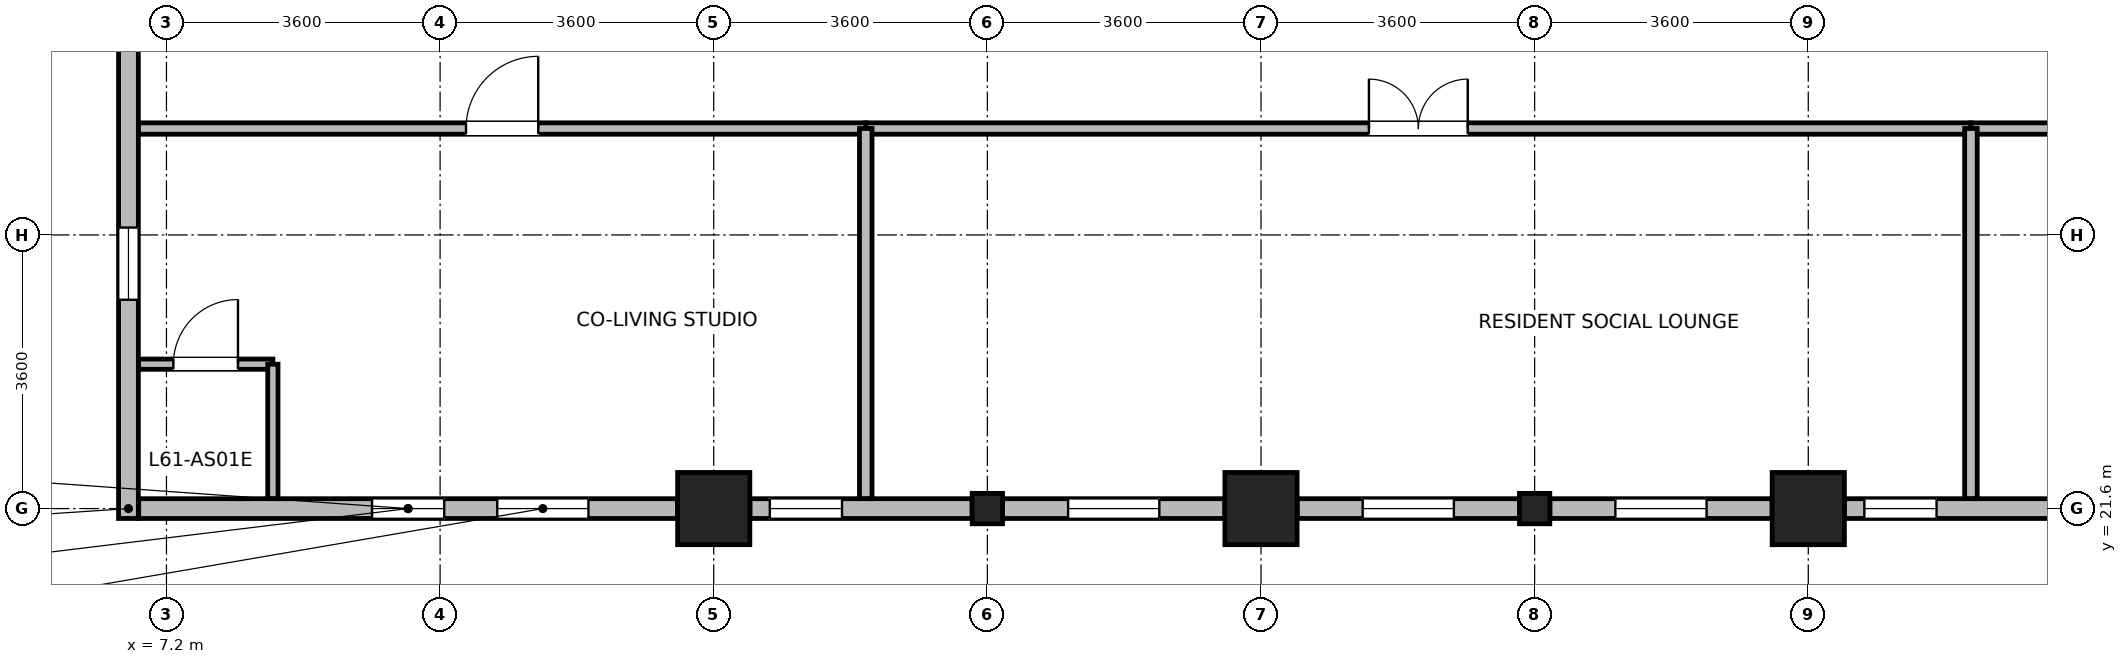
"""IFC4 building model, lengths in metres.
Left out: names, types, materials, properties, quantities, classifications, styles, units other than length and angle.
Written with IfcOpenShell. Run it as: python <this file> out.ifc"""

import sys

from ifc_helpers import new_model, si_unit, direction, frame, frame_2d, origin, origin_2d, place, context, subcontext, project, spatial, rectangle, i_section, extrude, source, transform, mapped, element, fill, save


model = new_model("IFC4")
c1 = context("Model", 3, precision=1e-05, world=origin(), true_north=direction((0.0, 1.0)))
c2 = subcontext(c1, "Body", "Model", "MODEL_VIEW")
j1 = project(units=[si_unit("LENGTHUNIT", "METRE"), si_unit("PLANEANGLEUNIT", "RADIAN")], contexts=[c1])
p1 = place(None, origin())
s1 = spatial("IfcSite", under=j1, at=p1, CompositionType="ELEMENT")
p2 = place(p1, origin())
s2 = spatial("IfcBuilding", under=s1, at=p2, CompositionType="ELEMENT")
p3 = place(p2, frame((0.0, 0.0, 238.8)))
s3 = spatial("IfcBuildingStorey", under=s2, at=p3, CompositionType="ELEMENT", Elevation=238.8)
m1 = source(origin(), c2, "Body", "SweptSolid", [
    extrude(rectangle(XDim=0.95, YDim=0.95, at=origin_2d()), origin(), (0.0, 0.0, 1.0), 3.7),
])
for number, where, z_axis, x_axis in (
    (1, (14.4, 21.6, 0.0), (0.0, 0.0, 1.0), (1.0, 0.0, 0.0)),
    (2, (21.6, 21.6, 0.0), (0.0, 0.0, 1.0), (1.0, 0.0, 0.0)),
    (3, (28.8, 21.6, 0.0), (0.0, 0.0, 1.0), (1.0, 0.0, 0.0)),
):
    element("IfcColumn", number, at=place(p3, frame(where, z_axis=z_axis, x_axis=x_axis)), inside=s3, PredefinedType="COLUMN", context=c2, shape_type="MappedRepresentation", body=[
        mapped(m1, transform((0.0, 0.0, 0.0), x_axis=(1.0, 0.0, 0.0), y_axis=(0.0, 1.0, 0.0), z_axis=(0.0, 0.0, 1.0), scale=1.0)),
    ])
m2 = source(origin(), c2, "Body", "SweptSolid", [
    extrude(i_section(OverallWidth=0.399, OverallDepth=0.4, WebThickness=0.017, FlangeThickness=0.023, FilletRadius=0.015, at=origin_2d()), origin(), (0.0, 0.0, 1.0), 3.7),
])
for number, where, z_axis, x_axis in (
    (4, (18.0, 21.6, 0.0), (0.0, 0.0, 1.0), (1.0, 0.0, 0.0)),
    (5, (25.2, 21.6, 0.0), (0.0, 0.0, 1.0), (1.0, 0.0, 0.0)),
):
    element("IfcColumn", number, at=place(p3, frame(where, z_axis=z_axis, x_axis=x_axis)), inside=s3, PredefinedType="COLUMN", context=c2, shape_type="MappedRepresentation", body=[
        mapped(m2, transform((0.0, 0.0, 0.0), x_axis=(1.0, 0.0, 0.0), y_axis=(0.0, 1.0, 0.0), z_axis=(0.0, 0.0, 1.0), scale=1.0)),
    ])
p4 = place(p3, frame((13.924, 21.6, 0.0), z_axis=(0.0, 0.0, 1.0), x_axis=(-1.0, 0.0, 0.0)))
e6 = element("IfcWall", 6, at=p4, inside=s3, PredefinedType="STANDARD", context=c2, shape_type="SweptSolid", body=[
    extrude(rectangle(XDim=7.089, YDim=0.26, at=frame_2d((3.544, 0.0))), origin(), (0.0, 0.0, 1.0), 3.42),
])
p5 = place(p4, frame((1.172, 0.0, 0.85)))
e7 = element("IfcOpeningElement", 7, at=p5, cuts=e6, PredefinedType="OPENING", context=c2, shape_type="SweptSolid", body=[
    extrude(rectangle(XDim=1.2, YDim=1.75, at=frame_2d((0.6, 0.875))), frame((0.0, 0.14, 0.0), z_axis=(0.0, -1.0, 0.0), x_axis=(1.0, 0.0, 0.0)), (0.0, 0.0, 1.0), 0.28),
])
p6 = place(p4, frame((3.07, 0.0, 0.85)))
e8 = element("IfcOpeningElement", 8, at=p6, cuts=e6, PredefinedType="OPENING", context=c2, shape_type="SweptSolid", body=[
    extrude(rectangle(XDim=0.95, YDim=1.75, at=frame_2d((0.475, 0.875))), frame((0.0, 0.14, 0.0), z_axis=(0.0, -1.0, 0.0), x_axis=(1.0, 0.0, 0.0)), (0.0, 0.0, 1.0), 0.28),
])
p7 = place(p3, frame((17.8, 21.6, 0.0), z_axis=(0.0, 0.0, 1.0), x_axis=(-1.0, 0.0, 0.0)))
e9 = element("IfcWall", 9, at=p7, inside=s3, PredefinedType="STANDARD", context=c2, shape_type="SweptSolid", body=[
    extrude(rectangle(XDim=2.924, YDim=0.26, at=frame_2d((1.462, 0.0))), origin(), (0.0, 0.0, 1.0), 3.02),
])
p8 = place(p7, frame((1.712, 0.0, 0.85)))
e10 = element("IfcOpeningElement", 10, at=p8, cuts=e9, PredefinedType="OPENING", context=c2, shape_type="SweptSolid", body=[
    extrude(rectangle(XDim=0.95, YDim=1.75, at=frame_2d((0.475, 0.875))), frame((0.0, 0.14, 0.0), z_axis=(0.0, -1.0, 0.0), x_axis=(1.0, 0.0, 0.0)), (0.0, 0.0, 1.0), 0.28),
])
p9 = place(p3, frame((21.124, 21.6, 0.0), z_axis=(0.0, 0.0, 1.0), x_axis=(-1.0, 0.0, 0.0)))
e11 = element("IfcWall", 11, at=p9, inside=s3, PredefinedType="STANDARD", context=c2, shape_type="SweptSolid", body=[
    extrude(rectangle(XDim=2.924, YDim=0.26, at=frame_2d((1.462, 0.0))), origin(), (0.0, 0.0, 1.0), 3.02),
])
p10 = place(p9, frame((0.862, 0.0, 0.85)))
e12 = element("IfcOpeningElement", 12, at=p10, cuts=e11, PredefinedType="OPENING", context=c2, shape_type="SweptSolid", body=[
    extrude(rectangle(XDim=1.2, YDim=1.75, at=frame_2d((0.6, 0.875))), frame((0.0, 0.14, 0.0), z_axis=(0.0, -1.0, 0.0), x_axis=(1.0, 0.0, 0.0)), (0.0, 0.0, 1.0), 0.28),
])
p11 = place(p3, frame((25.0, 21.6, 0.0), z_axis=(0.0, 0.0, 1.0), x_axis=(-1.0, 0.0, 0.0)))
e13 = element("IfcWall", 13, at=p11, inside=s3, PredefinedType="STANDARD", context=c2, shape_type="SweptSolid", body=[
    extrude(rectangle(XDim=2.924, YDim=0.26, at=frame_2d((1.462, 0.0))), origin(), (0.0, 0.0, 1.0), 3.02),
])
p12 = place(p11, frame((0.862, 0.0, 0.85)))
e14 = element("IfcOpeningElement", 14, at=p12, cuts=e13, PredefinedType="OPENING", context=c2, shape_type="SweptSolid", body=[
    extrude(rectangle(XDim=1.2, YDim=1.75, at=frame_2d((0.6, 0.875))), frame((0.0, 0.14, 0.0), z_axis=(0.0, -1.0, 0.0), x_axis=(1.0, 0.0, 0.0)), (0.0, 0.0, 1.0), 0.28),
])
p13 = place(p3, frame((28.324, 21.6, 0.0), z_axis=(0.0, 0.0, 1.0), x_axis=(-1.0, 0.0, 0.0)))
e15 = element("IfcWall", 15, at=p13, inside=s3, PredefinedType="STANDARD", context=c2, shape_type="SweptSolid", body=[
    extrude(rectangle(XDim=2.924, YDim=0.26, at=frame_2d((1.462, 0.0))), origin(), (0.0, 0.0, 1.0), 3.02),
])
p14 = place(p13, frame((0.862, 0.0, 0.85)))
e16 = element("IfcOpeningElement", 16, at=p14, cuts=e15, PredefinedType="OPENING", context=c2, shape_type="SweptSolid", body=[
    extrude(rectangle(XDim=1.2, YDim=1.75, at=frame_2d((0.6, 0.875))), frame((0.0, 0.14, 0.0), z_axis=(0.0, -1.0, 0.0), x_axis=(1.0, 0.0, 0.0)), (0.0, 0.0, 1.0), 0.28),
])
p15 = place(p3, frame((32.199, 21.6, 0.0), z_axis=(0.0, 0.0, 1.0), x_axis=(-1.0, 0.0, 0.0)))
e17 = element("IfcWall", 17, at=p15, inside=s3, PredefinedType="STANDARD", context=c2, shape_type="SweptSolid", body=[
    extrude(rectangle(XDim=2.924, YDim=0.26, at=frame_2d((1.462, 0.0))), origin(), (0.0, 0.0, 1.0), 3.02),
])
p16 = place(p15, frame((1.712, 0.0, 0.85)))
e18 = element("IfcOpeningElement", 18, at=p16, cuts=e17, PredefinedType="OPENING", context=c2, shape_type="SweptSolid", body=[
    extrude(rectangle(XDim=0.95, YDim=1.75, at=frame_2d((0.475, 0.875))), frame((0.0, 0.14, 0.0), z_axis=(0.0, -1.0, 0.0), x_axis=(1.0, 0.0, 0.0)), (0.0, 0.0, 1.0), 0.28),
])
p17 = place(p3, frame((6.7, 21.47, 0.0), z_axis=(0.0, 0.0, 1.0), x_axis=(0.0, 1.0, 0.0)))
e19 = element("IfcWall", 19, at=p17, inside=s3, PredefinedType="STANDARD", context=c2, shape_type="SweptSolid", body=[
    extrude(rectangle(XDim=6.704, YDim=0.26, at=frame_2d((3.352, 0.0))), origin(), (0.0, 0.0, 1.0), 3.42),
])
p18 = place(p17, frame((2.877, 0.0, 0.85)))
e20 = element("IfcOpeningElement", 20, at=p18, cuts=e19, PredefinedType="OPENING", context=c2, shape_type="SweptSolid", body=[
    extrude(rectangle(XDim=0.95, YDim=1.75, at=frame_2d((0.475, 0.875))), frame((0.0, 0.14, 0.0), z_axis=(0.0, -1.0, 0.0), x_axis=(1.0, 0.0, 0.0)), (0.0, 0.0, 1.0), 0.28),
])
p19 = place(p3, frame((6.832, 23.5, 0.0), z_axis=(0.0, 0.0, 1.0), x_axis=(1.0, 0.0, 0.0)))
e21 = element("IfcWall", 21, at=p19, inside=s3, PredefinedType="PARTITIONING", context=c2, shape_type="SweptSolid", body=[
    extrude(rectangle(XDim=1.768, YDim=0.135, at=frame_2d((0.884, 0.0))), origin(), (0.0, 0.0, 1.0), 3.42),
])
p20 = place(p19, frame((0.459, 0.0, 0.0)))
e22 = element("IfcOpeningElement", 22, at=p20, cuts=e21, PredefinedType="OPENING", context=c2, shape_type="SweptSolid", body=[
    extrude(rectangle(XDim=0.85, YDim=2.04, at=frame_2d((0.425, 1.02))), frame((0.0, 0.078, 0.0), z_axis=(0.0, -1.0, 0.0), x_axis=(1.0, 0.0, 0.0)), (0.0, 0.0, 1.0), 0.155),
])
p21 = place(p3, frame((8.6, 21.732, 0.0), z_axis=(0.0, 0.0, 1.0), x_axis=(0.0, 1.0, 0.0)))
e23 = element("IfcWall", 23, at=p21, inside=s3, PredefinedType="PARTITIONING", context=c2, shape_type="SweptSolid", body=[
    extrude(rectangle(XDim=1.768, YDim=0.135, at=frame_2d((0.884, 0.0))), origin(), (0.0, 0.0, 1.0), 3.42),
])
p22 = place(p3, frame((16.4, 26.6, 0.0), z_axis=(0.0, 0.0, 1.0), x_axis=(1.0, 0.0, 0.0)))
e24 = element("IfcWall", 24, at=p22, inside=s3, PredefinedType="PARTITIONING", context=c2, shape_type="SweptSolid", body=[
    extrude(rectangle(XDim=14.54, YDim=0.15, at=frame_2d((7.27, 0.0))), origin(), (0.0, 0.0, 1.0), 3.42),
])
p23 = place(p22, frame((6.62, 0.0, 0.0)))
e25 = element("IfcOpeningElement", 25, at=p23, cuts=e24, PredefinedType="OPENING", context=c2, shape_type="SweptSolid", body=[
    extrude(rectangle(XDim=1.3, YDim=2.12, at=frame_2d((0.65, 1.06))), frame((0.0, 0.085, 0.0), z_axis=(0.0, -1.0, 0.0), x_axis=(1.0, 0.0, 0.0)), (0.0, 0.0, 1.0), 0.17),
])
p24 = place(p3, frame((6.832, 26.6, 0.0), z_axis=(0.0, 0.0, 1.0), x_axis=(1.0, 0.0, 0.0)))
e26 = element("IfcWall", 26, at=p24, inside=s3, PredefinedType="PARTITIONING", context=c2, shape_type="SweptSolid", body=[
    extrude(rectangle(XDim=9.568, YDim=0.15, at=frame_2d((4.784, 0.0))), origin(), (0.0, 0.0, 1.0), 3.42),
])
p25 = place(p24, frame((4.309, 0.0, 0.0)))
e27 = element("IfcOpeningElement", 27, at=p25, cuts=e26, PredefinedType="OPENING", context=c2, shape_type="SweptSolid", body=[
    extrude(rectangle(XDim=0.95, YDim=2.1, at=frame_2d((0.475, 1.05))), frame((0.0, 0.085, 0.0), z_axis=(0.0, -1.0, 0.0), x_axis=(1.0, 0.0, 0.0)), (0.0, 0.0, 1.0), 0.17),
])
p26 = place(p3, frame((30.94, 26.6, 0.0), z_axis=(0.0, 0.0, 1.0), x_axis=(1.0, 0.0, 0.0)))
e28 = element("IfcWall", 28, at=p26, inside=s3, PredefinedType="PARTITIONING", context=c2, shape_type="SweptSolid", body=[
    extrude(rectangle(XDim=8.14, YDim=0.15, at=frame_2d((4.07, 0.0))), origin(), (0.0, 0.0, 1.0), 3.42),
])
p27 = place(p26, frame((3.42, 0.0, 0.0)))
e29 = element("IfcOpeningElement", 29, at=p27, cuts=e28, PredefinedType="OPENING", context=c2, shape_type="SweptSolid", body=[
    extrude(rectangle(XDim=1.3, YDim=2.12, at=frame_2d((0.65, 1.06))), frame((0.0, 0.085, 0.0), z_axis=(0.0, -1.0, 0.0), x_axis=(1.0, 0.0, 0.0)), (0.0, 0.0, 1.0), 0.17),
])
for number, where, z_axis, x_axis in (
    (30, (16.4, 21.732, 0.0), (0.0, 0.0, 1.0), (0.0, 1.0, 0.0)),
    (31, (30.94, 21.732, 0.0), (0.0, 0.0, 1.0), (0.0, 1.0, 0.0)),
):
    element("IfcWall", number, at=place(p3, frame(where, z_axis=z_axis, x_axis=x_axis)), inside=s3, PredefinedType="PARTITIONING", context=c2, shape_type="SweptSolid", body=[
        extrude(rectangle(XDim=4.868, YDim=0.165, at=frame_2d((2.434, 0.0))), origin(), (0.0, 0.0, 1.0), 3.42),
    ])
p28 = place(p5, origin())
e32 = element("IfcWindow", 32, at=p28, inside=s3, PartitioningType="SINGLE_PANEL", PredefinedType="WINDOW", context=c2, shape_type="SweptSolid", body=[
    extrude(rectangle(XDim=1.2, YDim=1.75, at=frame_2d((0.6, 0.875))), frame((0.0, 0.03, 0.0), z_axis=(0.0, -1.0, 0.0), x_axis=(1.0, 0.0, 0.0)), (0.0, 0.0, 1.0), 0.06),
])
fill(e7, e32)
p29 = place(p6, origin())
e33 = element("IfcWindow", 33, at=p29, inside=s3, PartitioningType="SINGLE_PANEL", PredefinedType="WINDOW", context=c2, shape_type="SweptSolid", body=[
    extrude(rectangle(XDim=0.95, YDim=1.75, at=frame_2d((0.475, 0.875))), frame((0.0, 0.03, 0.0), z_axis=(0.0, -1.0, 0.0), x_axis=(1.0, 0.0, 0.0)), (0.0, 0.0, 1.0), 0.06),
])
fill(e8, e33)
p30 = place(p8, origin())
e34 = element("IfcWindow", 34, at=p30, inside=s3, PartitioningType="SINGLE_PANEL", PredefinedType="WINDOW", context=c2, shape_type="SweptSolid", body=[
    extrude(rectangle(XDim=0.95, YDim=1.75, at=frame_2d((0.475, 0.875))), frame((0.0, 0.03, 0.0), z_axis=(0.0, -1.0, 0.0), x_axis=(1.0, 0.0, 0.0)), (0.0, 0.0, 1.0), 0.06),
])
fill(e10, e34)
p31 = place(p10, origin())
e35 = element("IfcWindow", 35, at=p31, inside=s3, PartitioningType="SINGLE_PANEL", PredefinedType="WINDOW", context=c2, shape_type="SweptSolid", body=[
    extrude(rectangle(XDim=1.2, YDim=1.75, at=frame_2d((0.6, 0.875))), frame((0.0, 0.03, 0.0), z_axis=(0.0, -1.0, 0.0), x_axis=(1.0, 0.0, 0.0)), (0.0, 0.0, 1.0), 0.06),
])
fill(e12, e35)
p32 = place(p12, origin())
e36 = element("IfcWindow", 36, at=p32, inside=s3, PartitioningType="SINGLE_PANEL", PredefinedType="WINDOW", context=c2, shape_type="SweptSolid", body=[
    extrude(rectangle(XDim=1.2, YDim=1.75, at=frame_2d((0.6, 0.875))), frame((0.0, 0.03, 0.0), z_axis=(0.0, -1.0, 0.0), x_axis=(1.0, 0.0, 0.0)), (0.0, 0.0, 1.0), 0.06),
])
fill(e14, e36)
p33 = place(p14, origin())
e37 = element("IfcWindow", 37, at=p33, inside=s3, PartitioningType="SINGLE_PANEL", PredefinedType="WINDOW", context=c2, shape_type="SweptSolid", body=[
    extrude(rectangle(XDim=1.2, YDim=1.75, at=frame_2d((0.6, 0.875))), frame((0.0, 0.03, 0.0), z_axis=(0.0, -1.0, 0.0), x_axis=(1.0, 0.0, 0.0)), (0.0, 0.0, 1.0), 0.06),
])
fill(e16, e37)
p34 = place(p16, origin())
e38 = element("IfcWindow", 38, at=p34, inside=s3, PartitioningType="SINGLE_PANEL", PredefinedType="WINDOW", context=c2, shape_type="SweptSolid", body=[
    extrude(rectangle(XDim=0.95, YDim=1.75, at=frame_2d((0.475, 0.875))), frame((0.0, 0.03, 0.0), z_axis=(0.0, -1.0, 0.0), x_axis=(1.0, 0.0, 0.0)), (0.0, 0.0, 1.0), 0.06),
])
fill(e18, e38)
p35 = place(p18, origin())
e39 = element("IfcWindow", 39, at=p35, inside=s3, PartitioningType="SINGLE_PANEL", PredefinedType="WINDOW", context=c2, shape_type="SweptSolid", body=[
    extrude(rectangle(XDim=0.95, YDim=1.75, at=frame_2d((0.475, 0.875))), frame((0.0, 0.03, 0.0), z_axis=(0.0, -1.0, 0.0), x_axis=(1.0, 0.0, 0.0)), (0.0, 0.0, 1.0), 0.06),
])
fill(e20, e39)
p36 = place(p20, origin())
e40 = element("IfcDoor", 40, at=p36, inside=s3, OperationType="SINGLE_SWING_RIGHT", PredefinedType="DOOR", context=c2, shape_type="SweptSolid", body=[
    extrude(rectangle(XDim=0.85, YDim=2.04, at=frame_2d((0.425, 1.02))), frame((0.0, 0.025, 0.0), z_axis=(0.0, -1.0, 0.0), x_axis=(1.0, 0.0, 0.0)), (0.0, 0.0, 1.0), 0.05),
])
fill(e22, e40)
p37 = place(p23, origin())
e41 = element("IfcDoor", 41, at=p37, inside=s3, OperationType="DOUBLE_DOOR_SINGLE_SWING", PredefinedType="DOOR", context=c2, shape_type="SweptSolid", body=[
    extrude(rectangle(XDim=1.3, YDim=2.12, at=frame_2d((0.65, 1.06))), frame((0.0, 0.025, 0.0), z_axis=(0.0, -1.0, 0.0), x_axis=(1.0, 0.0, 0.0)), (0.0, 0.0, 1.0), 0.05),
])
fill(e25, e41)
p38 = place(p25, origin())
e42 = element("IfcDoor", 42, at=p38, inside=s3, OperationType="SINGLE_SWING_RIGHT", PredefinedType="DOOR", context=c2, shape_type="SweptSolid", body=[
    extrude(rectangle(XDim=0.95, YDim=2.1, at=frame_2d((0.475, 1.05))), frame((0.0, 0.025, 0.0), z_axis=(0.0, -1.0, 0.0), x_axis=(1.0, 0.0, 0.0)), (0.0, 0.0, 1.0), 0.05),
])
fill(e27, e42)
save(model, sys.argv[1])
